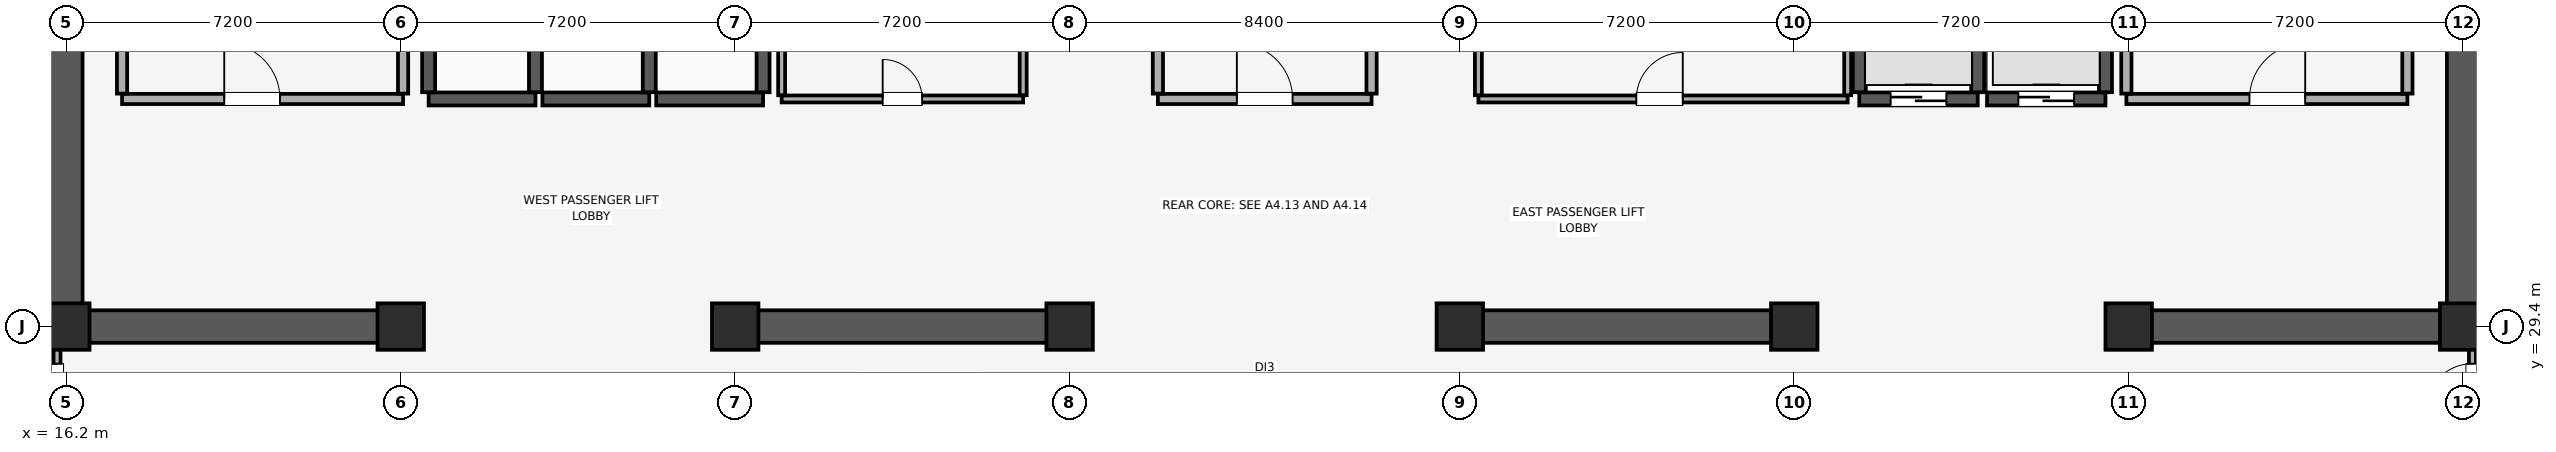
"""IFC4 building model, lengths in metres.
Left out: names, types, materials, properties, quantities, classifications, styles, units other than length and angle.
Written with IfcOpenShell. Run it as: python <this file> out.ifc"""

import sys

from ifc_helpers import new_model, si_unit, direction, frame, frame_2d, origin, origin_2d, place, context, subcontext, project, spatial, rectangle, extrude, element, fill, save


model = new_model("IFC4")
c1 = context("Model", 3, precision=1e-05, world=origin(), true_north=direction((0.0, 1.0)))
c2 = subcontext(c1, "Body", "Model", "MODEL_VIEW")
j1 = project(units=[si_unit("LENGTHUNIT", "METRE"), si_unit("PLANEANGLEUNIT", "RADIAN")], contexts=[c1])
p1 = place(None, origin())
s1 = spatial("IfcSite", under=j1, at=p1, CompositionType="ELEMENT")
p2 = place(p1, origin())
s2 = spatial("IfcBuilding", under=s1, at=p2, CompositionType="ELEMENT")
p3 = place(p2, frame((0.0, 0.0, 294.7)))
s3 = spatial("IfcBuildingStorey", under=s2, at=p3, CompositionType="ELEMENT", Elevation=294.7)
for number, where, z_axis, x_axis in (
    (1, (16.2, 29.4, 0.0), (0.0, 0.0, 1.0), (1.0, 0.0, 0.0)),
    (2, (23.4, 29.4, 0.0), (0.0, 0.0, 1.0), (1.0, 0.0, 0.0)),
    (3, (30.6, 29.4, 0.0), (0.0, 0.0, 1.0), (1.0, 0.0, 0.0)),
    (4, (37.8, 29.4, 0.0), (0.0, 0.0, 1.0), (1.0, 0.0, 0.0)),
    (5, (46.2, 29.4, 0.0), (0.0, 0.0, 1.0), (1.0, 0.0, 0.0)),
    (6, (53.4, 29.4, 0.0), (0.0, 0.0, 1.0), (1.0, 0.0, 0.0)),
    (7, (60.6, 29.4, 0.0), (0.0, 0.0, 1.0), (1.0, 0.0, 0.0)),
    (8, (67.8, 29.4, 0.0), (0.0, 0.0, 1.0), (1.0, 0.0, 0.0)),
):
    element("IfcColumn", number, at=place(p3, frame(where, z_axis=z_axis, x_axis=x_axis)), inside=s3, PredefinedType="COLUMN", context=c2, shape_type="SweptSolid", body=[
        extrude(rectangle(XDim=1.0, YDim=1.0, at=origin_2d()), origin(), (0.0, 0.0, 1.0), 5.12),
    ])
for number, where, z_axis, x_axis in (
    (9, (16.2, 29.4, 0.0), (0.0, 0.0, 1.0), (0.0, 1.0, 0.0)),
    (10, (67.8, 29.4, 0.0), (0.0, 0.0, 1.0), (0.0, 1.0, 0.0)),
):
    element("IfcWall", number, at=place(p3, frame(where, z_axis=z_axis, x_axis=x_axis)), inside=s3, PredefinedType="SHEAR", context=c2, shape_type="SweptSolid", body=[
        extrude(rectangle(XDim=19.2, YDim=0.7, at=frame_2d((9.6, 0.0))), origin(), (0.0, 0.0, 1.0), 5.12),
    ])
p4 = place(p3, frame((16.555, 29.4, 0.0), z_axis=(0.0, 0.0, 1.0), x_axis=(1.0, 0.0, 0.0)))
e11 = element("IfcWall", 11, at=p4, inside=s3, PredefinedType="SHEAR", context=c2, shape_type="SweptSolid", body=[
    extrude(rectangle(XDim=7.045, YDim=0.7, at=frame_2d((3.522, 0.0))), origin(), (0.0, 0.0, 1.0), 5.12),
])
for number, where, z_axis, x_axis in (
    (12, (30.4, 29.4, 0.0), (0.0, 0.0, 1.0), (1.0, 0.0, 0.0)),
    (13, (46.0, 29.4, 0.0), (0.0, 0.0, 1.0), (1.0, 0.0, 0.0)),
):
    element("IfcWall", number, at=place(p3, frame(where, z_axis=z_axis, x_axis=x_axis)), inside=s3, PredefinedType="SHEAR", context=c2, shape_type="SweptSolid", body=[
        extrude(rectangle(XDim=7.6, YDim=0.7, at=frame_2d((3.8, 0.0))), origin(), (0.0, 0.0, 1.0), 5.12),
    ])
p5 = place(p3, frame((60.4, 29.4, 0.0), z_axis=(0.0, 0.0, 1.0), x_axis=(1.0, 0.0, 0.0)))
e14 = element("IfcWall", 14, at=p5, inside=s3, PredefinedType="SHEAR", context=c2, shape_type="SweptSolid", body=[
    extrude(rectangle(XDim=7.045, YDim=0.7, at=frame_2d((3.522, 0.0))), origin(), (0.0, 0.0, 1.0), 5.12),
])
p6 = place(p3, frame((24.0, 34.3, 0.0), z_axis=(0.0, 0.0, 1.0), x_axis=(1.0, 0.0, 0.0)))
e15 = element("IfcWall", 15, at=p6, inside=s3, PredefinedType="SHEAR", context=c2, shape_type="SweptSolid", body=[
    extrude(rectangle(XDim=2.3, YDim=0.28, at=frame_2d((1.15, 0.0))), origin(), (0.0, 0.0, 1.0), 5.12),
])
for number, where, z_axis, x_axis in (
    (16, (24.0, 34.445, 0.0), (0.0, 0.0, 1.0), (0.0, 1.0, 0.0)),
    (17, (26.3, 34.445, 0.0), (0.0, 0.0, 1.0), (0.0, 1.0, 0.0)),
):
    element("IfcWall", number, at=place(p3, frame(where, z_axis=z_axis, x_axis=x_axis)), inside=s3, PredefinedType="SHEAR", context=c2, shape_type="SweptSolid", body=[
        extrude(rectangle(XDim=2.01, YDim=0.28, at=frame_2d((1.005, 0.0))), origin(), (0.0, 0.0, 1.0), 5.12),
    ])
p7 = place(p3, frame((26.45, 34.3, 0.0), z_axis=(0.0, 0.0, 1.0), x_axis=(1.0, 0.0, 0.0)))
e18 = element("IfcWall", 18, at=p7, inside=s3, PredefinedType="SHEAR", context=c2, shape_type="SweptSolid", body=[
    extrude(rectangle(XDim=2.3, YDim=0.28, at=frame_2d((1.15, 0.0))), origin(), (0.0, 0.0, 1.0), 5.12),
])
p8 = place(p3, frame((28.75, 34.445, 0.0), z_axis=(0.0, 0.0, 1.0), x_axis=(0.0, 1.0, 0.0)))
e19 = element("IfcWall", 19, at=p8, inside=s3, PredefinedType="SHEAR", context=c2, shape_type="SweptSolid", body=[
    extrude(rectangle(XDim=2.01, YDim=0.28, at=frame_2d((1.005, 0.0))), origin(), (0.0, 0.0, 1.0), 5.12),
])
p9 = place(p3, frame((28.9, 34.3, 0.0), z_axis=(0.0, 0.0, 1.0), x_axis=(1.0, 0.0, 0.0)))
e20 = element("IfcWall", 20, at=p9, inside=s3, PredefinedType="SHEAR", context=c2, shape_type="SweptSolid", body=[
    extrude(rectangle(XDim=2.3, YDim=0.28, at=frame_2d((1.15, 0.0))), origin(), (0.0, 0.0, 1.0), 5.12),
])
p10 = place(p3, frame((31.2, 34.445, 0.0), z_axis=(0.0, 0.0, 1.0), x_axis=(0.0, 1.0, 0.0)))
e21 = element("IfcWall", 21, at=p10, inside=s3, PredefinedType="SHEAR", context=c2, shape_type="SweptSolid", body=[
    extrude(rectangle(XDim=2.01, YDim=0.28, at=frame_2d((1.005, 0.0))), origin(), (0.0, 0.0, 1.0), 5.12),
])
p11 = place(p3, frame((54.8, 34.3, 0.0), z_axis=(0.0, 0.0, 1.0), x_axis=(1.0, 0.0, 0.0)))
e22 = element("IfcWall", 22, at=p11, inside=s3, PredefinedType="SHEAR", context=c2, shape_type="SweptSolid", body=[
    extrude(rectangle(XDim=2.55, YDim=0.28, at=frame_2d((1.275, 0.0))), origin(), (0.0, 0.0, 1.0), 5.12),
])
p12 = place(p11, frame((0.675, 0.0, 0.0)))
e23 = element("IfcOpeningElement", 23, at=p12, cuts=e22, PredefinedType="OPENING", context=c2, shape_type="SweptSolid", body=[
    extrude(rectangle(XDim=1.2, YDim=2.25, at=frame_2d((0.6, 1.125))), frame((0.0, 0.15, 0.0), z_axis=(0.0, -1.0, 0.0), x_axis=(1.0, 0.0, 0.0)), (0.0, 0.0, 1.0), 0.3),
])
for number, where, z_axis, x_axis in (
    (24, (54.8, 34.445, 0.0), (0.0, 0.0, 1.0), (0.0, 1.0, 0.0)),
    (25, (57.35, 34.445, 0.0), (0.0, 0.0, 1.0), (0.0, 1.0, 0.0)),
):
    element("IfcWall", number, at=place(p3, frame(where, z_axis=z_axis, x_axis=x_axis)), inside=s3, PredefinedType="SHEAR", context=c2, shape_type="SweptSolid", body=[
        extrude(rectangle(XDim=2.11, YDim=0.28, at=frame_2d((1.055, 0.0))), origin(), (0.0, 0.0, 1.0), 5.12),
    ])
p13 = place(p3, frame((57.55, 34.3, 0.0), z_axis=(0.0, 0.0, 1.0), x_axis=(1.0, 0.0, 0.0)))
e26 = element("IfcWall", 26, at=p13, inside=s3, PredefinedType="SHEAR", context=c2, shape_type="SweptSolid", body=[
    extrude(rectangle(XDim=2.55, YDim=0.28, at=frame_2d((1.275, 0.0))), origin(), (0.0, 0.0, 1.0), 5.12),
])
p14 = place(p13, frame((0.675, 0.0, 0.0)))
e27 = element("IfcOpeningElement", 27, at=p14, cuts=e26, PredefinedType="OPENING", context=c2, shape_type="SweptSolid", body=[
    extrude(rectangle(XDim=1.2, YDim=2.25, at=frame_2d((0.6, 1.125))), frame((0.0, 0.15, 0.0), z_axis=(0.0, -1.0, 0.0), x_axis=(1.0, 0.0, 0.0)), (0.0, 0.0, 1.0), 0.3),
])
p15 = place(p3, frame((60.1, 34.445, 0.0), z_axis=(0.0, 0.0, 1.0), x_axis=(0.0, 1.0, 0.0)))
e28 = element("IfcWall", 28, at=p15, inside=s3, PredefinedType="SHEAR", context=c2, shape_type="SweptSolid", body=[
    extrude(rectangle(XDim=2.11, YDim=0.28, at=frame_2d((1.055, 0.0))), origin(), (0.0, 0.0, 1.0), 5.12),
])
p16 = place(p3, frame((17.4, 34.3, 0.0), z_axis=(0.0, 0.0, 1.0), x_axis=(1.0, 0.0, 0.0)))
e29 = element("IfcWall", 29, at=p16, inside=s3, PredefinedType="PARTITIONING", context=c2, shape_type="SweptSolid", body=[
    extrude(rectangle(XDim=6.05, YDim=0.22, at=frame_2d((3.025, 0.0))), origin(), (0.0, 0.0, 1.0), 5.12),
])
p17 = place(p16, frame((2.2, 0.0, 0.0)))
e30 = element("IfcOpeningElement", 30, at=p17, cuts=e29, PredefinedType="OPENING", context=c2, shape_type="SweptSolid", body=[
    extrude(rectangle(XDim=1.2, YDim=2.15, at=frame_2d((0.6, 1.075))), frame((0.0, 0.12, 0.0), z_axis=(0.0, -1.0, 0.0), x_axis=(1.0, 0.0, 0.0)), (0.0, 0.0, 1.0), 0.24),
])
p18 = place(p3, frame((17.4, 34.415, 0.0), z_axis=(0.0, 0.0, 1.0), x_axis=(0.0, 1.0, 0.0)))
e31 = element("IfcWall", 31, at=p18, inside=s3, PredefinedType="PARTITIONING", context=c2, shape_type="SweptSolid", body=[
    extrude(rectangle(XDim=5.43, YDim=0.22, at=frame_2d((2.715, 0.0))), origin(), (0.0, 0.0, 1.0), 5.12),
])
p19 = place(p3, frame((23.45, 34.415, 0.0), z_axis=(0.0, 0.0, 1.0), x_axis=(0.0, 1.0, 0.0)))
e32 = element("IfcWall", 32, at=p19, inside=s3, PredefinedType="PARTITIONING", context=c2, shape_type="SweptSolid", body=[
    extrude(rectangle(XDim=5.64, YDim=0.22, at=frame_2d((2.82, 0.0))), origin(), (0.0, 0.0, 1.0), 5.12),
])
p20 = place(p3, frame((60.55, 34.3, 0.0), z_axis=(0.0, 0.0, 1.0), x_axis=(1.0, 0.0, 0.0)))
e33 = element("IfcWall", 33, at=p20, inside=s3, PredefinedType="PARTITIONING", context=c2, shape_type="SweptSolid", body=[
    extrude(rectangle(XDim=6.05, YDim=0.22, at=frame_2d((3.025, 0.0))), origin(), (0.0, 0.0, 1.0), 5.12),
])
p21 = place(p20, frame((2.65, 0.0, 0.0)))
e34 = element("IfcOpeningElement", 34, at=p21, cuts=e33, PredefinedType="OPENING", context=c2, shape_type="SweptSolid", body=[
    extrude(rectangle(XDim=1.2, YDim=2.15, at=frame_2d((0.6, 1.075))), frame((0.0, 0.12, 0.0), z_axis=(0.0, -1.0, 0.0), x_axis=(1.0, 0.0, 0.0)), (0.0, 0.0, 1.0), 0.24),
])
p22 = place(p3, frame((60.55, 34.415, 0.0), z_axis=(0.0, 0.0, 1.0), x_axis=(0.0, 1.0, 0.0)))
e35 = element("IfcWall", 35, at=p22, inside=s3, PredefinedType="PARTITIONING", context=c2, shape_type="SweptSolid", body=[
    extrude(rectangle(XDim=5.64, YDim=0.22, at=frame_2d((2.82, 0.0))), origin(), (0.0, 0.0, 1.0), 5.12),
])
p23 = place(p3, frame((66.6, 34.415, 0.0), z_axis=(0.0, 0.0, 1.0), x_axis=(0.0, 1.0, 0.0)))
e36 = element("IfcWall", 36, at=p23, inside=s3, PredefinedType="PARTITIONING", context=c2, shape_type="SweptSolid", body=[
    extrude(rectangle(XDim=5.43, YDim=0.22, at=frame_2d((2.715, 0.0))), origin(), (0.0, 0.0, 1.0), 5.12),
])
p24 = place(p3, frame((39.7, 34.3, 0.0), z_axis=(0.0, 0.0, 1.0), x_axis=(1.0, 0.0, 0.0)))
e37 = element("IfcWall", 37, at=p24, inside=s3, PredefinedType="PARTITIONING", context=c2, shape_type="SweptSolid", body=[
    extrude(rectangle(XDim=4.6, YDim=0.22, at=frame_2d((2.3, 0.0))), origin(), (0.0, 0.0, 1.0), 5.12),
])
p25 = place(p24, frame((1.7, 0.0, 0.0)))
e38 = element("IfcOpeningElement", 38, at=p25, cuts=e37, PredefinedType="OPENING", context=c2, shape_type="SweptSolid", body=[
    extrude(rectangle(XDim=1.2, YDim=2.15, at=frame_2d((0.6, 1.075))), frame((0.0, 0.12, 0.0), z_axis=(0.0, -1.0, 0.0), x_axis=(1.0, 0.0, 0.0)), (0.0, 0.0, 1.0), 0.24),
])
for number, where, z_axis, x_axis in (
    (39, (39.7, 34.415, 0.0), (0.0, 0.0, 1.0), (0.0, 1.0, 0.0)),
    (40, (44.3, 34.415, 0.0), (0.0, 0.0, 1.0), (0.0, 1.0, 0.0)),
):
    element("IfcWall", number, at=place(p3, frame(where, z_axis=z_axis, x_axis=x_axis)), inside=s3, PredefinedType="PARTITIONING", context=c2, shape_type="SweptSolid", body=[
        extrude(rectangle(XDim=5.785, YDim=0.22, at=frame_2d((2.893, 0.0))), origin(), (0.0, 0.0, 1.0), 5.12),
    ])
p26 = place(p3, frame((31.6, 34.3, 0.0), z_axis=(0.0, 0.0, 1.0), x_axis=(1.0, 0.0, 0.0)))
e41 = element("IfcWall", 41, at=p26, inside=s3, PredefinedType="PARTITIONING", context=c2, shape_type="SweptSolid", body=[
    extrude(rectangle(XDim=5.2, YDim=0.15, at=frame_2d((2.6, 0.0))), origin(), (0.0, 0.0, 1.0), 5.12),
])
p27 = place(p26, frame((2.175, 0.0, 0.0)))
e42 = element("IfcOpeningElement", 42, at=p27, cuts=e41, PredefinedType="OPENING", context=c2, shape_type="SweptSolid", body=[
    extrude(rectangle(XDim=0.85, YDim=2.1, at=frame_2d((0.425, 1.05))), frame((0.0, 0.085, 0.0), z_axis=(0.0, -1.0, 0.0), x_axis=(1.0, 0.0, 0.0)), (0.0, 0.0, 1.0), 0.17),
])
for number, where, z_axis, x_axis in (
    (43, (31.6, 34.38, 0.0), (0.0, 0.0, 1.0), (0.0, 1.0, 0.0)),
    (44, (36.8, 34.38, 0.0), (0.0, 0.0, 1.0), (0.0, 1.0, 0.0)),
):
    element("IfcWall", number, at=place(p3, frame(where, z_axis=z_axis, x_axis=x_axis)), inside=s3, PredefinedType="PARTITIONING", context=c2, shape_type="SweptSolid", body=[
        extrude(rectangle(XDim=4.94, YDim=0.15, at=frame_2d((2.47, 0.0))), origin(), (0.0, 0.0, 1.0), 5.12),
    ])
p28 = place(p3, frame((46.6, 34.3, 0.0), z_axis=(0.0, 0.0, 1.0), x_axis=(1.0, 0.0, 0.0)))
e45 = element("IfcWall", 45, at=p28, inside=s3, PredefinedType="PARTITIONING", context=c2, shape_type="SweptSolid", body=[
    extrude(rectangle(XDim=7.95, YDim=0.15, at=frame_2d((3.975, 0.0))), origin(), (0.0, 0.0, 1.0), 5.12),
])
p29 = place(p28, frame((3.4, 0.0, 0.0)))
e46 = element("IfcOpeningElement", 46, at=p29, cuts=e45, PredefinedType="OPENING", context=c2, shape_type="SweptSolid", body=[
    extrude(rectangle(XDim=1.0, YDim=2.15, at=frame_2d((0.5, 1.075))), frame((0.0, 0.085, 0.0), z_axis=(0.0, -1.0, 0.0), x_axis=(1.0, 0.0, 0.0)), (0.0, 0.0, 1.0), 0.17),
])
for number, where, z_axis, x_axis in (
    (47, (46.6, 34.38, 0.0), (0.0, 0.0, 1.0), (0.0, 1.0, 0.0)),
    (48, (54.55, 34.38, 0.0), (0.0, 0.0, 1.0), (0.0, 1.0, 0.0)),
):
    element("IfcWall", number, at=place(p3, frame(where, z_axis=z_axis, x_axis=x_axis)), inside=s3, PredefinedType="PARTITIONING", context=c2, shape_type="SweptSolid", body=[
        extrude(rectangle(XDim=4.94, YDim=0.15, at=frame_2d((2.47, 0.0))), origin(), (0.0, 0.0, 1.0), 5.12),
    ])
p30 = place(p3, frame((16.0, 26.88, 0.0), z_axis=(0.0, 0.0, 1.0), x_axis=(0.0, 1.0, 0.0)))
e49 = element("IfcWall", 49, at=p30, inside=s3, PredefinedType="PARTITIONING", context=c2, shape_type="SweptSolid", body=[
    extrude(rectangle(XDim=2.51, YDim=0.15, at=frame_2d((1.255, 0.0))), origin(), (0.0, 0.0, 1.0), 4.76),
])
p31 = place(p30, frame((0.72, 0.0, 0.0)))
e50 = element("IfcOpeningElement", 50, at=p31, cuts=e49, PredefinedType="OPENING", context=c2, shape_type="SweptSolid", body=[
    extrude(rectangle(XDim=1.0, YDim=2.15, at=frame_2d((0.5, 1.075))), frame((0.0, 0.085, 0.0), z_axis=(0.0, -1.0, 0.0), x_axis=(1.0, 0.0, 0.0)), (0.0, 0.0, 1.0), 0.17),
])
p32 = place(p3, frame((68.0, 26.88, 0.0), z_axis=(0.0, 0.0, 1.0), x_axis=(0.0, 1.0, 0.0)))
e51 = element("IfcWall", 51, at=p32, inside=s3, PredefinedType="PARTITIONING", context=c2, shape_type="SweptSolid", body=[
    extrude(rectangle(XDim=2.51, YDim=0.15, at=frame_2d((1.255, 0.0))), origin(), (0.0, 0.0, 1.0), 4.76),
])
p33 = place(p32, frame((0.72, 0.0, 0.0)))
e52 = element("IfcOpeningElement", 52, at=p33, cuts=e51, PredefinedType="OPENING", context=c2, shape_type="SweptSolid", body=[
    extrude(rectangle(XDim=1.0, YDim=2.15, at=frame_2d((0.5, 1.075))), frame((0.0, 0.085, 0.0), z_axis=(0.0, -1.0, 0.0), x_axis=(1.0, 0.0, 0.0)), (0.0, 0.0, 1.0), 0.17),
])
p34 = place(p12, origin())
e53 = element("IfcDoor", 53, at=p34, inside=s3, OperationType="DOUBLE_DOOR_SLIDING", PredefinedType="DOOR", context=c2, shape_type="SweptSolid", body=[
    extrude(rectangle(XDim=1.2, YDim=2.25, at=frame_2d((0.6, 1.125))), frame((0.0, 0.025, 0.0), z_axis=(0.0, -1.0, 0.0), x_axis=(1.0, 0.0, 0.0)), (0.0, 0.0, 1.0), 0.05),
])
fill(e23, e53)
p35 = place(p14, origin())
e54 = element("IfcDoor", 54, at=p35, inside=s3, OperationType="DOUBLE_DOOR_SLIDING", PredefinedType="DOOR", context=c2, shape_type="SweptSolid", body=[
    extrude(rectangle(XDim=1.2, YDim=2.25, at=frame_2d((0.6, 1.125))), frame((0.0, 0.025, 0.0), z_axis=(0.0, -1.0, 0.0), x_axis=(1.0, 0.0, 0.0)), (0.0, 0.0, 1.0), 0.05),
])
fill(e27, e54)
p36 = place(p17, origin())
e55 = element("IfcDoor", 55, at=p36, inside=s3, OperationType="SINGLE_SWING_LEFT", PredefinedType="DOOR", context=c2, shape_type="SweptSolid", body=[
    extrude(rectangle(XDim=1.2, YDim=2.15, at=frame_2d((0.6, 1.075))), frame((0.0, 0.025, 0.0), z_axis=(0.0, -1.0, 0.0), x_axis=(1.0, 0.0, 0.0)), (0.0, 0.0, 1.0), 0.05),
])
fill(e30, e55)
p37 = place(p21, origin())
e56 = element("IfcDoor", 56, at=p37, inside=s3, OperationType="SINGLE_SWING_RIGHT", PredefinedType="DOOR", context=c2, shape_type="SweptSolid", body=[
    extrude(rectangle(XDim=1.2, YDim=2.15, at=frame_2d((0.6, 1.075))), frame((0.0, 0.025, 0.0), z_axis=(0.0, -1.0, 0.0), x_axis=(1.0, 0.0, 0.0)), (0.0, 0.0, 1.0), 0.05),
])
fill(e34, e56)
p38 = place(p25, origin())
e57 = element("IfcDoor", 57, at=p38, inside=s3, OperationType="SINGLE_SWING_LEFT", PredefinedType="DOOR", context=c2, shape_type="SweptSolid", body=[
    extrude(rectangle(XDim=1.2, YDim=2.15, at=frame_2d((0.6, 1.075))), frame((0.0, 0.025, 0.0), z_axis=(0.0, -1.0, 0.0), x_axis=(1.0, 0.0, 0.0)), (0.0, 0.0, 1.0), 0.05),
])
fill(e38, e57)
p39 = place(p27, origin())
e58 = element("IfcDoor", 58, at=p39, inside=s3, OperationType="SINGLE_SWING_LEFT", PredefinedType="DOOR", context=c2, shape_type="SweptSolid", body=[
    extrude(rectangle(XDim=0.85, YDim=2.1, at=frame_2d((0.425, 1.05))), frame((0.0, 0.025, 0.0), z_axis=(0.0, -1.0, 0.0), x_axis=(1.0, 0.0, 0.0)), (0.0, 0.0, 1.0), 0.05),
])
fill(e42, e58)
p40 = place(p29, origin())
e59 = element("IfcDoor", 59, at=p40, inside=s3, OperationType="SINGLE_SWING_RIGHT", PredefinedType="DOOR", context=c2, shape_type="SweptSolid", body=[
    extrude(rectangle(XDim=1.0, YDim=2.15, at=frame_2d((0.5, 1.075))), frame((0.0, 0.025, 0.0), z_axis=(0.0, -1.0, 0.0), x_axis=(1.0, 0.0, 0.0)), (0.0, 0.0, 1.0), 0.05),
])
fill(e46, e59)
p41 = place(p31, origin())
e60 = element("IfcDoor", 60, at=p41, inside=s3, OperationType="SINGLE_SWING_RIGHT", PredefinedType="DOOR", context=c2, shape_type="SweptSolid", body=[
    extrude(rectangle(XDim=1.0, YDim=2.15, at=frame_2d((0.5, 1.075))), frame((0.0, 0.025, 0.0), z_axis=(0.0, -1.0, 0.0), x_axis=(1.0, 0.0, 0.0)), (0.0, 0.0, 1.0), 0.05),
])
fill(e50, e60)
p42 = place(p33, origin())
e61 = element("IfcDoor", 61, at=p42, inside=s3, OperationType="SINGLE_SWING_LEFT", PredefinedType="DOOR", context=c2, shape_type="SweptSolid", body=[
    extrude(rectangle(XDim=1.0, YDim=2.15, at=frame_2d((0.5, 1.075))), frame((0.0, 0.025, 0.0), z_axis=(0.0, -1.0, 0.0), x_axis=(1.0, 0.0, 0.0)), (0.0, 0.0, 1.0), 0.05),
])
fill(e52, e61)
save(model, sys.argv[1])
